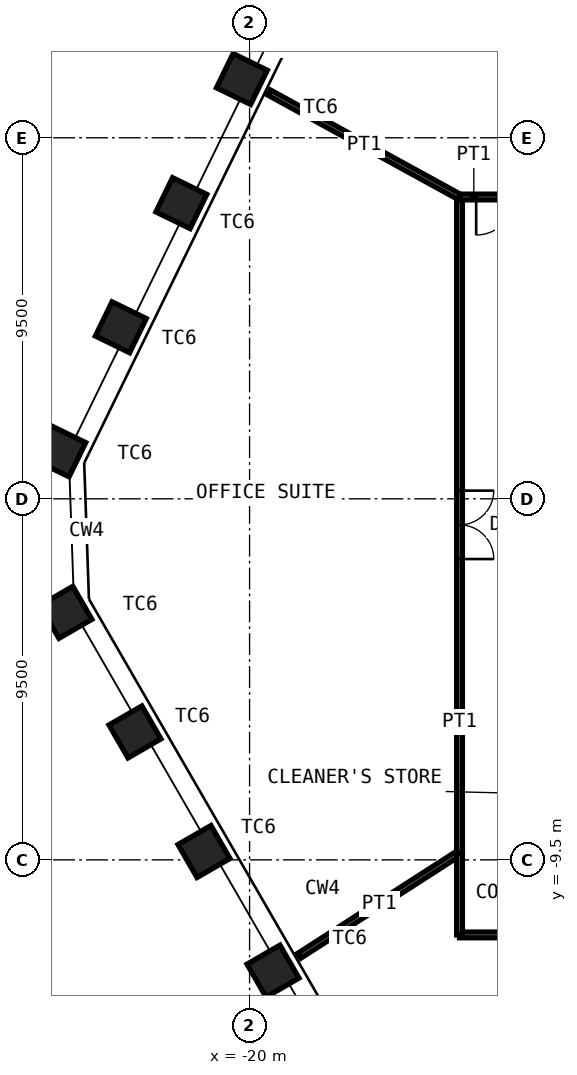
"""IFC4 building model, lengths in metres.
Left out: names, types, materials, properties, quantities, classifications, styles, units other than length and angle.
Written with IfcOpenShell. Run it as: python <this file> out.ifc"""

import sys

from ifc_helpers import new_model, si_unit, direction, frame, frame_2d, origin, origin_2d, place, context, subcontext, project, spatial, rectangle, hollow_rectangle, extrude, element, fill, save


model = new_model("IFC4")
c1 = context("Model", 3, precision=1e-05, world=origin(), true_north=direction((0.0, 1.0)))
c2 = subcontext(c1, "Body", "Model", "MODEL_VIEW")
j1 = project(units=[si_unit("LENGTHUNIT", "METRE"), si_unit("PLANEANGLEUNIT", "RADIAN")], contexts=[c1])
p1 = place(None, origin())
s1 = spatial("IfcSite", under=j1, at=p1, CompositionType="ELEMENT")
p2 = place(p1, origin())
s2 = spatial("IfcBuilding", under=s1, at=p2, CompositionType="ELEMENT")
p3 = place(p2, frame((0.0, 0.0, 230.8)))
s3 = spatial("IfcBuildingStorey", under=s2, at=p3, CompositionType="ELEMENT", Elevation=230.8)
for number, where, z_axis, x_axis in (
    (1, (-19.383, -12.428, 0.0), (0.0, 0.0, 1.0), (0.5, -0.866, 0.0)),
    (2, (-21.2, -9.281, 0.0), (0.0, 0.0, 1.0), (0.5, -0.866, 0.0)),
    (3, (-23.016, -6.134, 0.0), (0.0, 0.0, 1.0), (0.5, -0.866, 0.0)),
    (4, (-24.833, -2.988, 0.0), (0.0, 0.0, 1.0), (0.5, -0.866, 0.0)),
    (5, (-24.981, 1.248, 0.0), (0.0, 0.0, 1.0), (-0.438, -0.899, 0.0)),
    (6, (-23.388, 4.514, 0.0), (0.0, 0.0, 1.0), (-0.438, -0.899, 0.0)),
    (7, (-21.795, 7.78, 0.0), (0.0, 0.0, 1.0), (-0.438, -0.899, 0.0)),
    (8, (-20.203, 11.045, 0.0), (0.0, 0.0, 1.0), (-0.438, -0.899, 0.0)),
):
    element("IfcColumn", number, at=place(p3, frame(where, z_axis=z_axis, x_axis=x_axis)), inside=s3, PredefinedType="COLUMN", context=c2, shape_type="SweptSolid", body=[
        extrude(hollow_rectangle(XDim=1.0, YDim=1.0, WallThickness=0.06, at=origin_2d()), origin(), (0.0, 0.0, 1.0), 4.2),
    ])
p4 = place(p3, frame((-18.693, -12.024, 0.0), z_axis=(0.0, 0.0, 1.0), x_axis=(0.841031335058, 0.540986407824, 0.0)))
e9 = element("IfcWall", 9, at=p4, inside=s3, PredefinedType="PARTITIONING", context=c2, shape_type="SweptSolid", body=[
    extrude(rectangle(XDim=5.015, YDim=0.15, at=frame_2d((2.507, 0.0))), origin(), (0.0, 0.0, 1.0), 3.43),
])
p5 = place(p3, frame((-14.475, -9.311, 0.0), z_axis=(0.0, 0.0, 1.0), x_axis=(0.0, 1.0, 0.0)))
e10 = element("IfcWall", 10, at=p5, inside=s3, PredefinedType="PARTITIONING", context=c2, shape_type="SweptSolid", body=[
    extrude(rectangle(XDim=17.252, YDim=0.15, at=frame_2d((8.626, 0.0))), origin(), (0.0, 0.0, 1.0), 4.03),
])
p6 = place(p5, frame((7.726, 0.0, 0.0)))
e11 = element("IfcOpeningElement", 11, at=p6, cuts=e10, PredefinedType="OPENING", context=c2, shape_type="SweptSolid", body=[
    extrude(rectangle(XDim=1.8, YDim=2.4, at=frame_2d((0.9, 1.2))), frame((0.0, 0.085, 0.0), z_axis=(0.0, -1.0, 0.0), x_axis=(1.0, 0.0, 0.0)), (0.0, 0.0, 1.0), 0.17),
])
p7 = place(p3, frame((-19.486, 10.69, 0.0), z_axis=(0.0, 0.0, 1.0), x_axis=(0.876724089264, -0.480993629172, 0.0)))
e12 = element("IfcWall", 12, at=p7, inside=s3, PredefinedType="PARTITIONING", context=c2, shape_type="SweptSolid", body=[
    extrude(rectangle(XDim=5.715, YDim=0.15, at=frame_2d((2.858, 0.0))), origin(), (0.0, 0.0, 1.0), 3.43),
])
p8 = place(p3, frame((-14.475, 7.941, 0.0), z_axis=(0.0, 0.0, 1.0), x_axis=(1.0, 0.0, 0.0)))
e13 = element("IfcWall", 13, at=p8, inside=s3, PredefinedType="PARTITIONING", context=c2, shape_type="SweptSolid", body=[
    extrude(rectangle(XDim=1.875, YDim=0.15, at=frame_2d((0.938, 0.0))), origin(), (0.0, 0.0, 1.0), 4.03),
])
p9 = place(p8, frame((0.438, 0.0, 0.0)))
e14 = element("IfcOpeningElement", 14, at=p9, cuts=e13, PredefinedType="OPENING", context=c2, shape_type="SweptSolid", body=[
    extrude(rectangle(XDim=1.0, YDim=2.4, at=frame_2d((0.5, 1.2))), frame((0.0, 0.085, 0.0), z_axis=(0.0, -1.0, 0.0), x_axis=(1.0, 0.0, 0.0)), (0.0, 0.0, 1.0), 0.17),
])
p10 = place(p3, frame((-14.737, 20.455, 0.0), z_axis=(0.0, 0.0, 1.0), x_axis=(0.584547025688, -0.811359830629, 0.0)))
e15 = element("IfcWall", 15, at=p10, inside=s3, PredefinedType="PARTITIONING", context=c2, shape_type="SweptSolid", body=[
    extrude(rectangle(XDim=11.068, YDim=0.15, at=frame_2d((5.534, 0.0))), origin(), (0.0, 0.0, 1.0), 2.93),
])
p11 = place(p3, frame((-15.08, -18.294, 0.0), z_axis=(0.0, 0.0, 1.0), x_axis=(0.636052894953, 0.771645459277, 0.0)))
e16 = element("IfcWall", 16, at=p11, inside=s3, PredefinedType="PARTITIONING", context=c2, shape_type="SweptSolid", body=[
    extrude(rectangle(XDim=8.837, YDim=0.15, at=frame_2d((4.418, 0.0))), origin(), (0.0, 0.0, 1.0), 3.43),
])
p12 = place(p3, frame((-9.459, -11.475, 0.0), z_axis=(0.0, 0.0, 1.0), x_axis=(-1.0, 0.0, 0.0)))
e17 = element("IfcWall", 17, at=p12, inside=s3, PredefinedType="PARTITIONING", context=c2, shape_type="SweptSolid", body=[
    extrude(rectangle(XDim=5.016, YDim=0.15, at=frame_2d((2.508, 0.0))), origin(), (0.0, 0.0, 1.0), 4.03),
])
p13 = place(p12, frame((2.008, 0.0, 0.0)))
e18 = element("IfcOpeningElement", 18, at=p13, cuts=e17, PredefinedType="OPENING", context=c2, shape_type="SweptSolid", body=[
    extrude(rectangle(XDim=1.0, YDim=2.4, at=frame_2d((0.5, 1.2))), frame((0.0, 0.085, 0.0), z_axis=(0.0, -1.0, 0.0), x_axis=(1.0, 0.0, 0.0)), (0.0, 0.0, 1.0), 0.17),
])
p14 = place(p3, frame((-14.475, -11.475, 0.0), z_axis=(0.0, 0.0, 1.0), x_axis=(0.0, 1.0, 0.0)))
e19 = element("IfcWall", 19, at=p14, inside=s3, PredefinedType="PARTITIONING", context=c2, shape_type="SweptSolid", body=[
    extrude(rectangle(XDim=2.164, YDim=0.15, at=frame_2d((1.082, 0.0))), origin(), (0.0, 0.0, 1.0), 4.03),
])
p15 = place(p6, origin())
e20 = element("IfcDoor", 20, at=p15, inside=s3, OperationType="DOUBLE_DOOR_DOUBLE_SWING", PredefinedType="DOOR", context=c2, shape_type="SweptSolid", body=[
    extrude(rectangle(XDim=1.8, YDim=2.4, at=frame_2d((0.9, 1.2))), frame((0.0, 0.025, 0.0), z_axis=(0.0, -1.0, 0.0), x_axis=(1.0, 0.0, 0.0)), (0.0, 0.0, 1.0), 0.05),
])
fill(e11, e20)
p16 = place(p9, origin())
e21 = element("IfcDoor", 21, at=p16, inside=s3, OperationType="SINGLE_SWING_LEFT", PredefinedType="DOOR", context=c2, shape_type="SweptSolid", body=[
    extrude(rectangle(XDim=1.0, YDim=2.4, at=frame_2d((0.5, 1.2))), frame((0.0, 0.025, 0.0), z_axis=(0.0, -1.0, 0.0), x_axis=(1.0, 0.0, 0.0)), (0.0, 0.0, 1.0), 0.05),
])
fill(e14, e21)
save(model, sys.argv[1])
